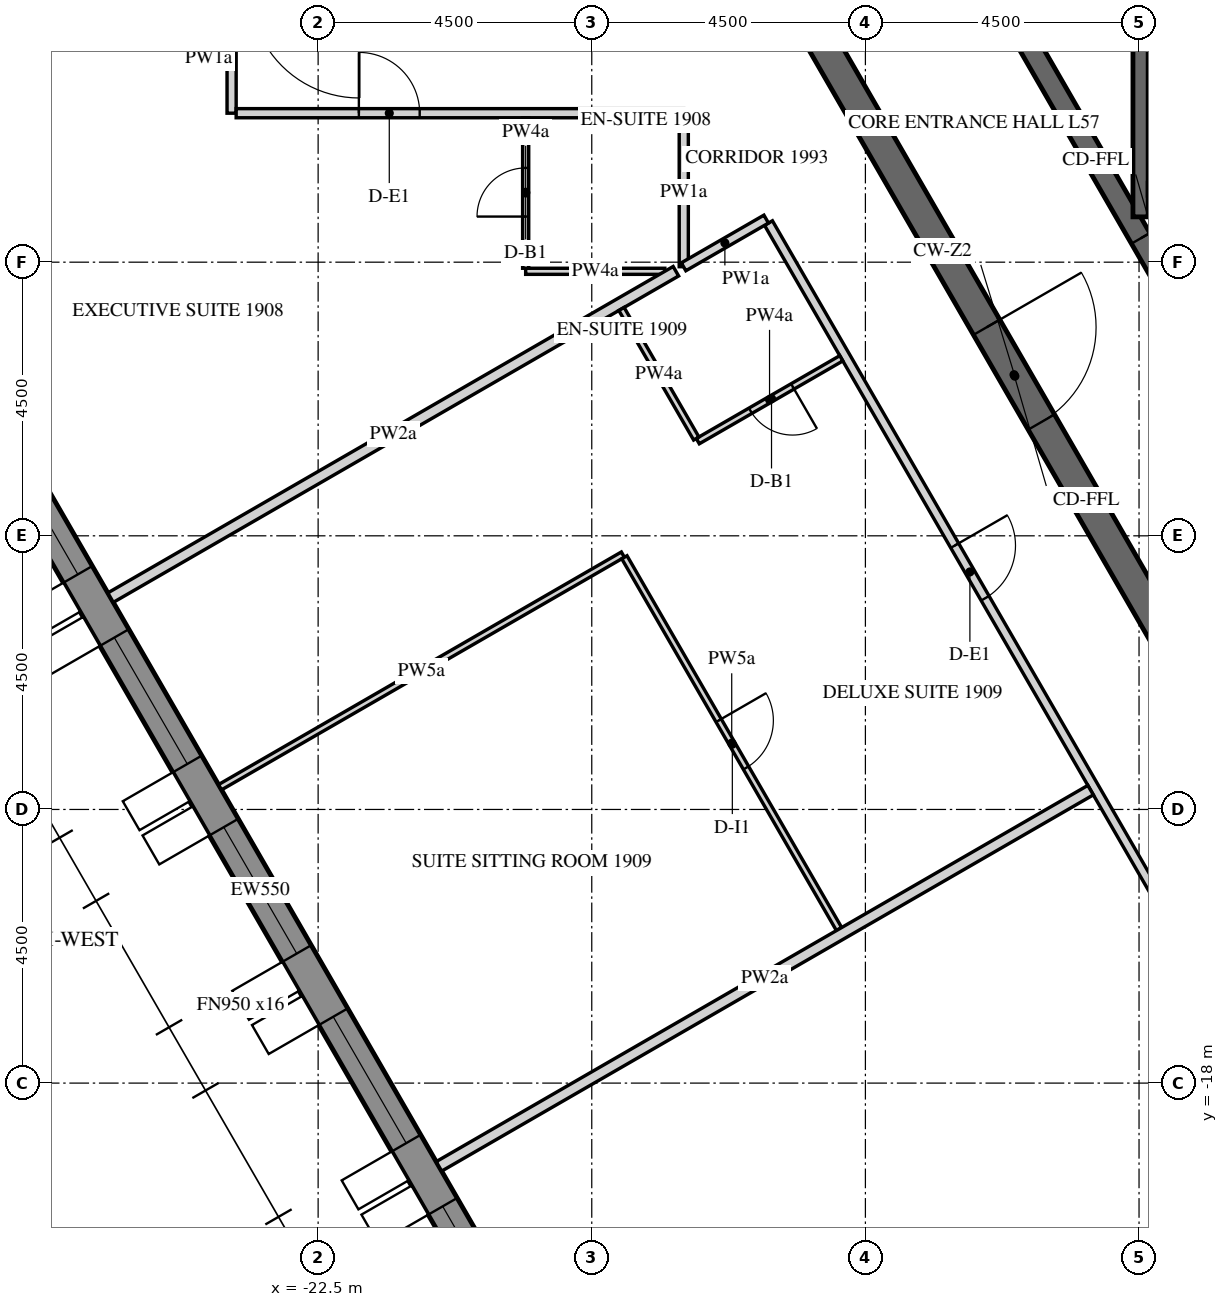
"""IFC4 building model, lengths in metres.
Left out: names, types, materials, properties, quantities, classifications, styles, units other than length and angle.
Written with IfcOpenShell. Run it as: python <this file> out.ifc"""

import sys

from ifc_helpers import new_model, si_unit, direction, frame, frame_2d, origin, place, context, subcontext, project, spatial, polyline, rectangle, outline, extrude, element, fill, save


model = new_model("IFC4")
c1 = context("Model", 3, precision=1e-05, world=origin(), true_north=direction((0.0, 1.0)))
c2 = subcontext(c1, "Body", "Model", "MODEL_VIEW")
j1 = project(units=[si_unit("LENGTHUNIT", "METRE"), si_unit("PLANEANGLEUNIT", "RADIAN")], contexts=[c1])
p1 = place(None, origin())
s1 = spatial("IfcSite", under=j1, at=p1, CompositionType="ELEMENT")
p2 = place(p1, origin())
s2 = spatial("IfcBuilding", under=s1, at=p2, CompositionType="ELEMENT")
p3 = place(p2, frame((0.0, 0.0, 238.5)))
s3 = spatial("IfcBuildingStorey", under=s2, at=p3, CompositionType="ELEMENT", Elevation=238.5)
p4 = place(p3, frame((-30.391, -2.811, -0.15), z_axis=(0.0, 0.0, 1.0), x_axis=(0.499998569178, -0.866026229868, 0.0)))
e1 = element("IfcWall", 1, at=p4, inside=s3, PredefinedType="SOLIDWALL", context=c2, shape_type="SweptSolid", body=[
    extrude(outline(polyline([(-0.022, -0.275), (27.783, -0.275), (27.732, 0.275), (0.022, 0.275), (-0.022, -0.275)])), origin(), (0.0, 0.0, 1.0), 3.9),
])
p5 = place(p4, frame((1.879, 0.0, 1.05)))
e2 = element("IfcOpeningElement", 2, at=p5, cuts=e1, PredefinedType="OPENING", context=c2, shape_type="SweptSolid", body=[
    extrude(rectangle(XDim=2.4, YDim=2.4, at=frame_2d((1.2, 1.2))), frame((0.0, 0.285, 0.0), z_axis=(0.0, -1.0, 0.0), x_axis=(1.0, 0.0, 0.0)), (0.0, 0.0, 1.0), 0.57),
])
p6 = place(p4, frame((5.479, 0.0, 1.05)))
e3 = element("IfcOpeningElement", 3, at=p6, cuts=e1, PredefinedType="OPENING", context=c2, shape_type="SweptSolid", body=[
    extrude(rectangle(XDim=2.4, YDim=2.4, at=frame_2d((1.2, 1.2))), frame((0.0, 0.285, 0.0), z_axis=(0.0, -1.0, 0.0), x_axis=(1.0, 0.0, 0.0)), (0.0, 0.0, 1.0), 0.57),
])
p7 = place(p4, frame((9.079, 0.0, 1.05)))
e4 = element("IfcOpeningElement", 4, at=p7, cuts=e1, PredefinedType="OPENING", context=c2, shape_type="SweptSolid", body=[
    extrude(rectangle(XDim=2.4, YDim=2.4, at=frame_2d((1.2, 1.2))), frame((0.0, 0.285, 0.0), z_axis=(0.0, -1.0, 0.0), x_axis=(1.0, 0.0, 0.0)), (0.0, 0.0, 1.0), 0.57),
])
p8 = place(p4, frame((12.679, 0.0, 1.05)))
e5 = element("IfcOpeningElement", 5, at=p8, cuts=e1, PredefinedType="OPENING", context=c2, shape_type="SweptSolid", body=[
    extrude(rectangle(XDim=2.4, YDim=2.4, at=frame_2d((1.2, 1.2))), frame((0.0, 0.285, 0.0), z_axis=(0.0, -1.0, 0.0), x_axis=(1.0, 0.0, 0.0)), (0.0, 0.0, 1.0), 0.57),
])
p9 = place(p4, frame((16.279, 0.0, 1.05)))
e6 = element("IfcOpeningElement", 6, at=p9, cuts=e1, PredefinedType="OPENING", context=c2, shape_type="SweptSolid", body=[
    extrude(rectangle(XDim=2.4, YDim=2.4, at=frame_2d((1.2, 1.2))), frame((0.0, 0.285, 0.0), z_axis=(0.0, -1.0, 0.0), x_axis=(1.0, 0.0, 0.0)), (0.0, 0.0, 1.0), 0.57),
])
p10 = place(p4, frame((19.879, 0.0, 1.05)))
e7 = element("IfcOpeningElement", 7, at=p10, cuts=e1, PredefinedType="OPENING", context=c2, shape_type="SweptSolid", body=[
    extrude(rectangle(XDim=2.4, YDim=2.4, at=frame_2d((1.2, 1.2))), frame((0.0, 0.285, 0.0), z_axis=(0.0, -1.0, 0.0), x_axis=(1.0, 0.0, 0.0)), (0.0, 0.0, 1.0), 0.57),
])
p11 = place(p4, frame((23.479, 0.0, 1.05)))
e8 = element("IfcOpeningElement", 8, at=p11, cuts=e1, PredefinedType="OPENING", context=c2, shape_type="SweptSolid", body=[
    extrude(rectangle(XDim=2.4, YDim=2.4, at=frame_2d((1.2, 1.2))), frame((0.0, 0.285, 0.0), z_axis=(0.0, -1.0, 0.0), x_axis=(1.0, 0.0, 0.0)), (0.0, 0.0, 1.0), 0.57),
])
p12 = place(p3, frame((-14.722, 0.0, -0.15), z_axis=(0.0, 0.0, 1.0), x_axis=(0.50000571537, -0.866022103989, 0.0)))
e9 = element("IfcWall", 9, at=p12, inside=s3, PredefinedType="SHEAR", context=c2, shape_type="SweptSolid", body=[
    extrude(outline(polyline([(-0.144, -0.25), (14.867, -0.25), (14.578, 0.25), (0.144, 0.25), (-0.144, -0.25)])), origin(), (0.0, 0.0, 1.0), 3.9),
])
p13 = place(p12, frame((6.432, 0.0, 0.15)))
e10 = element("IfcOpeningElement", 10, at=p13, cuts=e9, PredefinedType="OPENING", context=c2, shape_type="SweptSolid", body=[
    extrude(rectangle(XDim=1.8, YDim=2.4, at=frame_2d((0.9, 1.2))), frame((0.0, 0.26, 0.0), z_axis=(0.0, -1.0, 0.0), x_axis=(1.0, 0.0, 0.0)), (0.0, 0.0, 1.0), 0.52),
])
p14 = place(p3, frame((-11.345, 0.0, -0.15), z_axis=(0.0, 0.0, 1.0), x_axis=(0.499995046907, -0.866028263435, 0.0)))
e11 = element("IfcWall", 11, at=p14, inside=s3, PredefinedType="SHEAR", context=c2, shape_type="SweptSolid", body=[
    extrude(outline(polyline([(-0.101, -0.175), (11.446, -0.175), (11.244, 0.175), (0.101, 0.175), (-0.101, -0.175)])), origin(), (0.0, 0.0, 1.0), 3.9),
])
p15 = place(p14, frame((4.744, 0.0, 0.15)))
e12 = element("IfcOpeningElement", 12, at=p15, cuts=e11, PredefinedType="OPENING", context=c2, shape_type="SweptSolid", body=[
    extrude(rectangle(XDim=1.8, YDim=2.4, at=frame_2d((0.9, 1.2))), frame((0.0, 0.185, 0.0), z_axis=(0.0, -1.0, 0.0), x_axis=(1.0, 0.0, 0.0)), (0.0, 0.0, 1.0), 0.37),
])
p16 = place(p3, frame((-8.975, -3.755, -0.25), z_axis=(0.0, 0.0, 1.0), x_axis=(0.0, 1.0, 0.0)))
e13 = element("IfcWall", 13, at=p16, inside=s3, PredefinedType="SHEAR", context=c2, shape_type="SweptSolid", body=[
    extrude(rectangle(XDim=7.51, YDim=0.25, at=frame_2d((3.755, 0.0))), origin(), (0.0, 0.0, 1.0), 3.9),
])
p17 = place(p3, frame((-8.85, -3.3, -0.25), z_axis=(0.0, 0.0, 1.0), x_axis=(1.0, 0.0, 0.0)))
e14 = element("IfcWall", 14, at=p17, inside=s3, PredefinedType="SHEAR", context=c2, shape_type="SweptSolid", body=[
    extrude(rectangle(XDim=2.95, YDim=0.2, at=frame_2d((1.475, 0.0))), origin(), (0.0, 0.0, 1.0), 3.9),
])
p18 = place(p17, frame((0.875, 0.0, 0.25)))
e15 = element("IfcOpeningElement", 15, at=p18, cuts=e14, PredefinedType="OPENING", context=c2, shape_type="SweptSolid", body=[
    extrude(rectangle(XDim=1.2, YDim=2.4, at=frame_2d((0.6, 1.2))), frame((0.0, 0.11, 0.0), z_axis=(0.0, -1.0, 0.0), x_axis=(1.0, 0.0, 0.0)), (0.0, 0.0, 1.0), 0.22),
])
p19 = place(p3, frame((-23.923, -0.25, 0.0), z_axis=(0.0, 0.0, 1.0), x_axis=(0.0, -1.0, 0.0)))
e16 = element("IfcWall", 16, at=p19, inside=s3, PredefinedType="PARTITIONING", context=c2, shape_type="SweptSolid", body=[
    extrude(rectangle(XDim=1.8, YDim=0.15, at=frame_2d((0.9, 0.0))), origin(), (0.0, 0.0, 1.0), 2.838),
])
p20 = place(p3, frame((-23.848, -2.05, 0.0), z_axis=(0.0, 0.0, 1.0), x_axis=(1.0, 0.0, 0.0)))
e17 = element("IfcWall", 17, at=p20, inside=s3, PredefinedType="PARTITIONING", context=c2, shape_type="SweptSolid", body=[
    extrude(rectangle(XDim=7.361, YDim=0.15, at=frame_2d((3.68, 0.0))), origin(), (0.0, 0.0, 1.0), 2.838),
])
p21 = place(p20, frame((2.018, 0.0, 0.0)))
e18 = element("IfcOpeningElement", 18, at=p21, cuts=e17, PredefinedType="OPENING", context=c2, shape_type="SweptSolid", body=[
    extrude(rectangle(XDim=1.0, YDim=2.1, at=frame_2d((0.5, 1.05))), frame((0.0, 0.085, 0.0), z_axis=(0.0, -1.0, 0.0), x_axis=(1.0, 0.0, 0.0)), (0.0, 0.0, 1.0), 0.17),
])
p22 = place(p3, frame((-16.487, -2.125, 0.0), z_axis=(0.0, 0.0, 1.0), x_axis=(0.0, -1.0, 0.0)))
e19 = element("IfcWall", 19, at=p22, inside=s3, PredefinedType="PARTITIONING", context=c2, shape_type="SweptSolid", body=[
    extrude(rectangle(XDim=2.449, YDim=0.15, at=frame_2d((1.225, 0.0))), origin(), (0.0, 0.0, 1.0), 2.838),
])
p23 = place(p3, frame((-15.094, -3.856, 0.0), z_axis=(0.0, 0.0, 1.0), x_axis=(0.500006037985, -0.866021917724, 0.0)))
e20 = element("IfcWall", 20, at=p23, inside=s3, PredefinedType="PARTITIONING", context=c2, shape_type="SweptSolid", body=[
    extrude(rectangle(XDim=12.867, YDim=0.15, at=frame_2d((6.434, 0.0))), origin(), (0.0, 0.0, 1.0), 2.838),
])
p24 = place(p23, frame((6.125, 0.0, 0.0)))
e21 = element("IfcOpeningElement", 21, at=p24, cuts=e20, PredefinedType="OPENING", context=c2, shape_type="SweptSolid", body=[
    extrude(rectangle(XDim=1.0, YDim=2.1, at=frame_2d((0.5, 1.05))), frame((0.0, 0.085, 0.0), z_axis=(0.0, -1.0, 0.0), x_axis=(1.0, 0.0, 0.0)), (0.0, 0.0, 1.0), 0.17),
])
p25 = place(p3, frame((-16.49, -4.576, 0.0), z_axis=(0.0, 0.0, 1.0), x_axis=(0.865993845424, 0.5000546567, 0.0)))
e22 = element("IfcWall", 22, at=p25, inside=s3, PredefinedType="PARTITIONING", context=c2, shape_type="SweptSolid", body=[
    extrude(rectangle(XDim=1.569, YDim=0.15, at=frame_2d((0.785, 0.0))), origin(), (0.0, 0.0, 1.0), 2.838),
])
p26 = place(p3, frame((-16.798, -4.65, 0.0), z_axis=(0.0, 0.0, 1.0), x_axis=(-1.0, 0.0, 0.0)))
e23 = element("IfcWall", 23, at=p26, inside=s3, PredefinedType="PARTITIONING", context=c2, shape_type="SweptSolid", body=[
    extrude(rectangle(XDim=2.289, YDim=0.1, at=frame_2d((1.144, 0.0))), origin(), (0.0, 0.0, 1.0), 2.838),
])
p27 = place(p3, frame((-19.087, -4.6, 0.0), z_axis=(0.0, 0.0, 1.0), x_axis=(0.0, 1.0, 0.0)))
e24 = element("IfcWall", 24, at=p27, inside=s3, PredefinedType="PARTITIONING", context=c2, shape_type="SweptSolid", body=[
    extrude(rectangle(XDim=2.475, YDim=0.1, at=frame_2d((1.238, 0.0))), origin(), (0.0, 0.0, 1.0), 2.838),
])
p28 = place(p27, frame((0.85, 0.0, 0.0)))
e25 = element("IfcOpeningElement", 25, at=p28, cuts=e24, PredefinedType="OPENING", context=c2, shape_type="SweptSolid", body=[
    extrude(rectangle(XDim=0.8, YDim=2.1, at=frame_2d((0.4, 1.05))), frame((0.0, 0.06, 0.0), z_axis=(0.0, -1.0, 0.0), x_axis=(1.0, 0.0, 0.0)), (0.0, 0.0, 1.0), 0.12),
])
p29 = place(p3, frame((-25.914, -10.017, 0.0), z_axis=(0.0, 0.0, 1.0), x_axis=(0.86602614826, 0.499998710529, 0.0)))
e26 = element("IfcWall", 26, at=p29, inside=s3, PredefinedType="PARTITIONING", context=c2, shape_type="SweptSolid", body=[
    extrude(rectangle(XDim=10.735, YDim=0.18, at=frame_2d((5.368, 0.0))), origin(), (0.0, 0.0, 1.0), 2.838),
])
p30 = place(p3, frame((-13.896, -6.081, 0.0), z_axis=(0.0, 0.0, 1.0), x_axis=(-0.866012511928, -0.500022328685, 0.0)))
e27 = element("IfcWall", 27, at=p30, inside=s3, PredefinedType="PARTITIONING", context=c2, shape_type="SweptSolid", body=[
    extrude(rectangle(XDim=2.725, YDim=0.1, at=frame_2d((1.363, 0.0))), origin(), (0.0, 0.0, 1.0), 2.838),
])
p31 = place(p30, frame((0.925, 0.0, 0.0)))
e28 = element("IfcOpeningElement", 28, at=p31, cuts=e27, PredefinedType="OPENING", context=c2, shape_type="SweptSolid", body=[
    extrude(rectangle(XDim=0.8, YDim=2.1, at=frame_2d((0.4, 1.05))), frame((0.0, 0.06, 0.0), z_axis=(0.0, -1.0, 0.0), x_axis=(1.0, 0.0, 0.0)), (0.0, 0.0, 1.0), 0.12),
])
p32 = place(p3, frame((-16.281, -7.4, 0.0), z_axis=(0.0, 0.0, 1.0), x_axis=(-0.500003092839, 0.866023618125, 0.0)))
e29 = element("IfcWall", 29, at=p32, inside=s3, PredefinedType="PARTITIONING", context=c2, shape_type="SweptSolid", body=[
    extrude(rectangle(XDim=2.46, YDim=0.1, at=frame_2d((1.23, 0.0))), origin(), (0.0, 0.0, 1.0), 2.838),
])
p33 = place(p3, frame((-24.114, -13.134, 0.0), z_axis=(0.0, 0.0, 1.0), x_axis=(0.866033062874, 0.499986733834, 0.0)))
e30 = element("IfcWall", 30, at=p33, inside=s3, PredefinedType="PARTITIONING", context=c2, shape_type="SweptSolid", body=[
    extrude(rectangle(XDim=7.65, YDim=0.1, at=frame_2d((3.825, 0.0))), origin(), (0.0, 0.0, 1.0), 2.838),
])
p34 = place(p3, frame((-17.463, -9.353, 0.0), z_axis=(0.0, 0.0, 1.0), x_axis=(0.499995846692, -0.866027801685, 0.0)))
e31 = element("IfcWall", 31, at=p34, inside=s3, PredefinedType="PARTITIONING", context=c2, shape_type="SweptSolid", body=[
    extrude(rectangle(XDim=7.06, YDim=0.1, at=frame_2d((3.53, 0.0))), origin(), (0.0, 0.0, 1.0), 2.838),
])
p35 = place(p34, frame((3.1, 0.0, 0.0)))
e32 = element("IfcOpeningElement", 32, at=p35, cuts=e31, PredefinedType="OPENING", context=c2, shape_type="SweptSolid", body=[
    extrude(rectangle(XDim=0.9, YDim=2.1, at=frame_2d((0.45, 1.05))), frame((0.0, 0.06, 0.0), z_axis=(0.0, -1.0, 0.0), x_axis=(1.0, 0.0, 0.0)), (0.0, 0.0, 1.0), 0.12),
])
p36 = place(p3, frame((-20.513, -19.37, 0.0), z_axis=(0.0, 0.0, 1.0), x_axis=(0.866024931941, 0.500000817256, 0.0)))
e33 = element("IfcWall", 33, at=p36, inside=s3, PredefinedType="PARTITIONING", context=c2, shape_type="SweptSolid", body=[
    extrude(rectangle(XDim=12.375, YDim=0.18, at=frame_2d((6.188, 0.0))), origin(), (0.0, 0.0, 1.0), 2.838),
])
p37 = place(p6, frame((0.0, 0.205, 0.0)))
e34 = element("IfcWindow", 34, at=p37, inside=s3, PartitioningType="DOUBLE_PANEL_VERTICAL", PredefinedType="WINDOW", context=c2, shape_type="SweptSolid", body=[
    extrude(rectangle(XDim=2.4, YDim=2.4, at=frame_2d((1.2, 1.2))), frame((0.0, 0.03, 0.0), z_axis=(0.0, -1.0, 0.0), x_axis=(1.0, 0.0, 0.0)), (0.0, 0.0, 1.0), 0.06),
])
fill(e3, e34)
p38 = place(p7, frame((0.0, 0.205, 0.0)))
e35 = element("IfcWindow", 35, at=p38, inside=s3, PartitioningType="DOUBLE_PANEL_VERTICAL", PredefinedType="WINDOW", context=c2, shape_type="SweptSolid", body=[
    extrude(rectangle(XDim=2.4, YDim=2.4, at=frame_2d((1.2, 1.2))), frame((0.0, 0.03, 0.0), z_axis=(0.0, -1.0, 0.0), x_axis=(1.0, 0.0, 0.0)), (0.0, 0.0, 1.0), 0.06),
])
fill(e4, e35)
p39 = place(p8, frame((0.0, 0.205, 0.0)))
e36 = element("IfcWindow", 36, at=p39, inside=s3, PartitioningType="DOUBLE_PANEL_VERTICAL", PredefinedType="WINDOW", context=c2, shape_type="SweptSolid", body=[
    extrude(rectangle(XDim=2.4, YDim=2.4, at=frame_2d((1.2, 1.2))), frame((0.0, 0.03, 0.0), z_axis=(0.0, -1.0, 0.0), x_axis=(1.0, 0.0, 0.0)), (0.0, 0.0, 1.0), 0.06),
])
fill(e5, e36)
p40 = place(p9, frame((0.0, 0.205, 0.0)))
e37 = element("IfcWindow", 37, at=p40, inside=s3, PartitioningType="DOUBLE_PANEL_VERTICAL", PredefinedType="WINDOW", context=c2, shape_type="SweptSolid", body=[
    extrude(rectangle(XDim=2.4, YDim=2.4, at=frame_2d((1.2, 1.2))), frame((0.0, 0.03, 0.0), z_axis=(0.0, -1.0, 0.0), x_axis=(1.0, 0.0, 0.0)), (0.0, 0.0, 1.0), 0.06),
])
fill(e6, e37)
p41 = place(p10, frame((0.0, 0.205, 0.0)))
e38 = element("IfcWindow", 38, at=p41, inside=s3, PartitioningType="DOUBLE_PANEL_VERTICAL", PredefinedType="WINDOW", context=c2, shape_type="SweptSolid", body=[
    extrude(rectangle(XDim=2.4, YDim=2.4, at=frame_2d((1.2, 1.2))), frame((0.0, 0.03, 0.0), z_axis=(0.0, -1.0, 0.0), x_axis=(1.0, 0.0, 0.0)), (0.0, 0.0, 1.0), 0.06),
])
fill(e7, e38)
p42 = place(p13, origin())
e39 = element("IfcDoor", 39, at=p42, inside=s3, OperationType="DOUBLE_DOOR_SINGLE_SWING", PredefinedType="DOOR", context=c2, shape_type="SweptSolid", body=[
    extrude(rectangle(XDim=1.8, YDim=2.4, at=frame_2d((0.9, 1.2))), frame((0.0, 0.025, 0.0), z_axis=(0.0, -1.0, 0.0), x_axis=(1.0, 0.0, 0.0)), (0.0, 0.0, 1.0), 0.05),
])
fill(e10, e39)
p43 = place(p15, origin())
e40 = element("IfcDoor", 40, at=p43, inside=s3, OperationType="DOUBLE_DOOR_SINGLE_SWING", PredefinedType="DOOR", context=c2, shape_type="SweptSolid", body=[
    extrude(rectangle(XDim=1.8, YDim=2.4, at=frame_2d((0.9, 1.2))), frame((0.0, 0.025, 0.0), z_axis=(0.0, -1.0, 0.0), x_axis=(1.0, 0.0, 0.0)), (0.0, 0.0, 1.0), 0.05),
])
fill(e12, e40)
p44 = place(p21, origin())
e41 = element("IfcDoor", 41, at=p44, inside=s3, OperationType="SINGLE_SWING_LEFT", PredefinedType="DOOR", context=c2, shape_type="SweptSolid", body=[
    extrude(rectangle(XDim=1.0, YDim=2.1, at=frame_2d((0.5, 1.05))), frame((0.0, 0.025, 0.0), z_axis=(0.0, -1.0, 0.0), x_axis=(1.0, 0.0, 0.0)), (0.0, 0.0, 1.0), 0.05),
])
fill(e18, e41)
p45 = place(p28, origin())
e42 = element("IfcDoor", 42, at=p45, inside=s3, OperationType="SINGLE_SWING_RIGHT", PredefinedType="DOOR", context=c2, shape_type="SweptSolid", body=[
    extrude(rectangle(XDim=0.8, YDim=2.1, at=frame_2d((0.4, 1.05))), frame((0.0, 0.025, 0.0), z_axis=(0.0, -1.0, 0.0), x_axis=(1.0, 0.0, 0.0)), (0.0, 0.0, 1.0), 0.05),
])
fill(e25, e42)
p46 = place(p24, origin())
e43 = element("IfcDoor", 43, at=p46, inside=s3, OperationType="SINGLE_SWING_LEFT", PredefinedType="DOOR", context=c2, shape_type="SweptSolid", body=[
    extrude(rectangle(XDim=1.0, YDim=2.1, at=frame_2d((0.5, 1.05))), frame((0.0, 0.025, 0.0), z_axis=(0.0, -1.0, 0.0), x_axis=(1.0, 0.0, 0.0)), (0.0, 0.0, 1.0), 0.05),
])
fill(e21, e43)
p47 = place(p31, origin())
e44 = element("IfcDoor", 44, at=p47, inside=s3, OperationType="SINGLE_SWING_RIGHT", PredefinedType="DOOR", context=c2, shape_type="SweptSolid", body=[
    extrude(rectangle(XDim=0.8, YDim=2.1, at=frame_2d((0.4, 1.05))), frame((0.0, 0.025, 0.0), z_axis=(0.0, -1.0, 0.0), x_axis=(1.0, 0.0, 0.0)), (0.0, 0.0, 1.0), 0.05),
])
fill(e28, e44)
p48 = place(p35, origin())
e45 = element("IfcDoor", 45, at=p48, inside=s3, OperationType="SINGLE_SWING_RIGHT", PredefinedType="DOOR", context=c2, shape_type="SweptSolid", body=[
    extrude(rectangle(XDim=0.9, YDim=2.1, at=frame_2d((0.45, 1.05))), frame((0.0, 0.025, 0.0), z_axis=(0.0, -1.0, 0.0), x_axis=(1.0, 0.0, 0.0)), (0.0, 0.0, 1.0), 0.05),
])
fill(e32, e45)
save(model, sys.argv[1])
